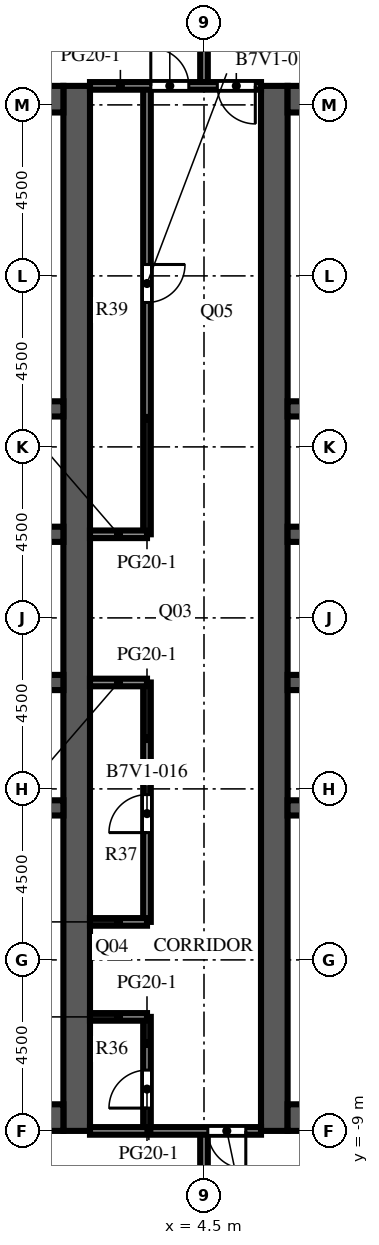
"""IFC4 building model, lengths in metres.
Left out: names, types, materials, properties, quantities, classifications, styles, units other than length and angle.
Written with IfcOpenShell. Run it as: python <this file> out.ifc"""

import sys

from ifc_helpers import new_model, si_unit, direction, frame, frame_2d, origin, place, context, subcontext, project, spatial, rectangle, extrude, element, fill, save


model = new_model("IFC4")
c1 = context("Model", 3, precision=1e-05, world=origin(), true_north=direction((0.0, 1.0)))
c2 = subcontext(c1, "Body", "Model", "MODEL_VIEW")
j1 = project(units=[si_unit("LENGTHUNIT", "METRE"), si_unit("PLANEANGLEUNIT", "RADIAN")], contexts=[c1])
p1 = place(None, origin())
s1 = spatial("IfcSite", under=j1, at=p1, CompositionType="ELEMENT")
p2 = place(p1, origin())
s2 = spatial("IfcBuilding", under=s1, at=p2, CompositionType="ELEMENT")
p3 = place(p2, frame((0.0, 0.0, 243.9)))
s3 = spatial("IfcBuildingStorey", under=s2, at=p3, CompositionType="ELEMENT", Elevation=243.9)
p4 = place(p3, frame((1.15, -9.0, 0.0), z_axis=(0.0, 0.0, 1.0), x_axis=(0.0, 1.0, 0.0)))
e1 = element("IfcWall", 1, at=p4, inside=s3, PredefinedType="SHEAR", context=c2, shape_type="SweptSolid", body=[
    extrude(rectangle(XDim=27.5, YDim=0.7, at=frame_2d((13.75, 0.0))), origin(), (0.0, 0.0, 1.0), 4.1),
])
p5 = place(p4, frame((12.55, 0.0, 0.0)))
e2 = element("IfcOpeningElement", 2, at=p5, cuts=e1, PredefinedType="OPENING", context=c2, shape_type="SweptSolid", body=[
    extrude(rectangle(XDim=2.4, YDim=2.4, at=frame_2d((1.2, 1.2))), frame((0.0, 0.36, 0.0), z_axis=(0.0, -1.0, 0.0), x_axis=(1.0, 0.0, 0.0)), (0.0, 0.0, 1.0), 0.72),
])
p6 = place(p4, frame((3.9, 0.0, 0.0)))
e3 = element("IfcOpeningElement", 3, at=p6, cuts=e1, PredefinedType="OPENING", context=c2, shape_type="SweptSolid", body=[
    extrude(rectangle(XDim=1.2, YDim=2.1, at=frame_2d((0.6, 1.05))), frame((0.0, 0.36, 0.0), z_axis=(0.0, -1.0, 0.0), x_axis=(1.0, 0.0, 0.0)), (0.0, 0.0, 1.0), 0.72),
])
p7 = place(p4, frame((22.4, 0.0, 0.0)))
e4 = element("IfcOpeningElement", 4, at=p7, cuts=e1, PredefinedType="OPENING", context=c2, shape_type="SweptSolid", body=[
    extrude(rectangle(XDim=1.2, YDim=2.1, at=frame_2d((0.6, 1.05))), frame((0.0, 0.36, 0.0), z_axis=(0.0, -1.0, 0.0), x_axis=(1.0, 0.0, 0.0)), (0.0, 0.0, 1.0), 0.72),
])
for number, where, z_axis, x_axis in (
    (5, (-9.8, -8.65, 0.0), (0.0, 0.0, 1.0), (1.0, 0.0, 0.0)),
    (6, (-9.8, 18.15, 0.0), (0.0, 0.0, 1.0), (1.0, 0.0, 0.0)),
):
    element("IfcWall", number, at=place(p3, frame(where, z_axis=z_axis, x_axis=x_axis)), inside=s3, PredefinedType="SHEAR", context=c2, shape_type="SweptSolid", body=[
        extrude(rectangle(XDim=10.6, YDim=0.7, at=frame_2d((5.3, 0.0))), origin(), (0.0, 0.0, 1.0), 4.1),
    ])
p8 = place(p3, frame((-9.8, -0.5, 0.0), z_axis=(0.0, 0.0, 1.0), x_axis=(1.0, 0.0, 0.0)))
e7 = element("IfcWall", 7, at=p8, inside=s3, PredefinedType="SHEAR", context=c2, shape_type="SweptSolid", body=[
    extrude(rectangle(XDim=10.6, YDim=0.4, at=frame_2d((5.3, 0.0))), origin(), (0.0, 0.0, 1.0), 4.1),
])
p9 = place(p3, frame((-9.8, 2.8, 0.0), z_axis=(0.0, 0.0, 1.0), x_axis=(1.0, 0.0, 0.0)))
e8 = element("IfcWall", 8, at=p9, inside=s3, PredefinedType="SHEAR", context=c2, shape_type="SweptSolid", body=[
    extrude(rectangle(XDim=10.6, YDim=0.4, at=frame_2d((5.3, 0.0))), origin(), (0.0, 0.0, 1.0), 4.1),
])
p10 = place(p9, frame((0.688, 0.0, 0.0)))
e9 = element("IfcOpeningElement", 9, at=p10, cuts=e8, PredefinedType="OPENING", context=c2, shape_type="SweptSolid", body=[
    extrude(rectangle(XDim=1.1, YDim=2.1, at=frame_2d((0.55, 1.05))), frame((0.0, 0.21, 0.0), z_axis=(0.0, -1.0, 0.0), x_axis=(1.0, 0.0, 0.0)), (0.0, 0.0, 1.0), 0.42),
])
p11 = place(p9, frame((3.438, 0.0, 0.0)))
e10 = element("IfcOpeningElement", 10, at=p11, cuts=e8, PredefinedType="OPENING", context=c2, shape_type="SweptSolid", body=[
    extrude(rectangle(XDim=1.1, YDim=2.1, at=frame_2d((0.55, 1.05))), frame((0.0, 0.21, 0.0), z_axis=(0.0, -1.0, 0.0), x_axis=(1.0, 0.0, 0.0)), (0.0, 0.0, 1.0), 0.42),
])
p12 = place(p9, frame((6.113, 0.0, 0.0)))
e11 = element("IfcOpeningElement", 11, at=p12, cuts=e8, PredefinedType="OPENING", context=c2, shape_type="SweptSolid", body=[
    extrude(rectangle(XDim=1.0, YDim=2.1, at=frame_2d((0.5, 1.05))), frame((0.0, 0.21, 0.0), z_axis=(0.0, -1.0, 0.0), x_axis=(1.0, 0.0, 0.0)), (0.0, 0.0, 1.0), 0.42),
])
p13 = place(p9, frame((8.863, 0.0, 0.0)))
e12 = element("IfcOpeningElement", 12, at=p13, cuts=e8, PredefinedType="OPENING", context=c2, shape_type="SweptSolid", body=[
    extrude(rectangle(XDim=1.0, YDim=2.1, at=frame_2d((0.5, 1.05))), frame((0.0, 0.21, 0.0), z_axis=(0.0, -1.0, 0.0), x_axis=(1.0, 0.0, 0.0)), (0.0, 0.0, 1.0), 0.42),
])
p14 = place(p3, frame((-9.8, 6.7, 0.0), z_axis=(0.0, 0.0, 1.0), x_axis=(1.0, 0.0, 0.0)))
e13 = element("IfcWall", 13, at=p14, inside=s3, PredefinedType="SHEAR", context=c2, shape_type="SweptSolid", body=[
    extrude(rectangle(XDim=10.6, YDim=0.4, at=frame_2d((5.3, 0.0))), origin(), (0.0, 0.0, 1.0), 4.1),
])
p15 = place(p14, frame((3.438, 0.0, 0.0)))
e14 = element("IfcOpeningElement", 14, at=p15, cuts=e13, PredefinedType="OPENING", context=c2, shape_type="SweptSolid", body=[
    extrude(rectangle(XDim=1.1, YDim=2.1, at=frame_2d((0.55, 1.05))), frame((0.0, 0.21, 0.0), z_axis=(0.0, -1.0, 0.0), x_axis=(1.0, 0.0, 0.0)), (0.0, 0.0, 1.0), 0.42),
])
p16 = place(p14, frame((6.062, 0.0, 0.0)))
e15 = element("IfcOpeningElement", 15, at=p16, cuts=e13, PredefinedType="OPENING", context=c2, shape_type="SweptSolid", body=[
    extrude(rectangle(XDim=1.1, YDim=2.1, at=frame_2d((0.55, 1.05))), frame((0.0, 0.21, 0.0), z_axis=(0.0, -1.0, 0.0), x_axis=(1.0, 0.0, 0.0)), (0.0, 0.0, 1.0), 0.42),
])
p17 = place(p14, frame((8.812, 0.0, 0.0)))
e16 = element("IfcOpeningElement", 16, at=p17, cuts=e13, PredefinedType="OPENING", context=c2, shape_type="SweptSolid", body=[
    extrude(rectangle(XDim=1.1, YDim=2.1, at=frame_2d((0.55, 1.05))), frame((0.0, 0.21, 0.0), z_axis=(0.0, -1.0, 0.0), x_axis=(1.0, 0.0, 0.0)), (0.0, 0.0, 1.0), 0.42),
])
p18 = place(p14, frame((0.738, 0.0, 0.0)))
e17 = element("IfcOpeningElement", 17, at=p18, cuts=e13, PredefinedType="OPENING", context=c2, shape_type="SweptSolid", body=[
    extrude(rectangle(XDim=1.0, YDim=2.1, at=frame_2d((0.5, 1.05))), frame((0.0, 0.21, 0.0), z_axis=(0.0, -1.0, 0.0), x_axis=(1.0, 0.0, 0.0)), (0.0, 0.0, 1.0), 0.42),
])
p19 = place(p3, frame((-9.8, 10.0, 0.0), z_axis=(0.0, 0.0, 1.0), x_axis=(1.0, 0.0, 0.0)))
e18 = element("IfcWall", 18, at=p19, inside=s3, PredefinedType="SHEAR", context=c2, shape_type="SweptSolid", body=[
    extrude(rectangle(XDim=10.6, YDim=0.4, at=frame_2d((5.3, 0.0))), origin(), (0.0, 0.0, 1.0), 4.1),
])
p20 = place(p3, frame((6.35, -9.0, 0.0), z_axis=(0.0, 0.0, 1.0), x_axis=(0.0, 1.0, 0.0)))
e19 = element("IfcWall", 19, at=p20, inside=s3, PredefinedType="SHEAR", context=c2, shape_type="SweptSolid", body=[
    extrude(rectangle(XDim=27.5, YDim=0.7, at=frame_2d((13.75, 0.0))), origin(), (0.0, 0.0, 1.0), 4.1),
])
p21 = place(p20, frame((12.55, 0.0, 0.0)))
e20 = element("IfcOpeningElement", 20, at=p21, cuts=e19, PredefinedType="OPENING", context=c2, shape_type="SweptSolid", body=[
    extrude(rectangle(XDim=2.4, YDim=2.4, at=frame_2d((1.2, 1.2))), frame((0.0, 0.36, 0.0), z_axis=(0.0, -1.0, 0.0), x_axis=(1.0, 0.0, 0.0)), (0.0, 0.0, 1.0), 0.72),
])
p22 = place(p20, frame((3.9, 0.0, 0.0)))
e21 = element("IfcOpeningElement", 21, at=p22, cuts=e19, PredefinedType="OPENING", context=c2, shape_type="SweptSolid", body=[
    extrude(rectangle(XDim=1.2, YDim=2.1, at=frame_2d((0.6, 1.05))), frame((0.0, 0.36, 0.0), z_axis=(0.0, -1.0, 0.0), x_axis=(1.0, 0.0, 0.0)), (0.0, 0.0, 1.0), 0.72),
])
p23 = place(p20, frame((22.4, 0.0, 0.0)))
e22 = element("IfcOpeningElement", 22, at=p23, cuts=e19, PredefinedType="OPENING", context=c2, shape_type="SweptSolid", body=[
    extrude(rectangle(XDim=1.2, YDim=2.1, at=frame_2d((0.6, 1.05))), frame((0.0, 0.36, 0.0), z_axis=(0.0, -1.0, 0.0), x_axis=(1.0, 0.0, 0.0)), (0.0, 0.0, 1.0), 0.72),
])
for number, where, z_axis, x_axis in (
    (23, (6.7, -8.65, 0.0), (0.0, 0.0, 1.0), (1.0, 0.0, 0.0)),
    (24, (6.7, 18.15, 0.0), (0.0, 0.0, 1.0), (1.0, 0.0, 0.0)),
):
    element("IfcWall", number, at=place(p3, frame(where, z_axis=z_axis, x_axis=x_axis)), inside=s3, PredefinedType="SHEAR", context=c2, shape_type="SweptSolid", body=[
        extrude(rectangle(XDim=10.6, YDim=0.7, at=frame_2d((5.3, 0.0))), origin(), (0.0, 0.0, 1.0), 4.1),
    ])
p24 = place(p3, frame((6.7, -0.5, 0.0), z_axis=(0.0, 0.0, 1.0), x_axis=(1.0, 0.0, 0.0)))
e25 = element("IfcWall", 25, at=p24, inside=s3, PredefinedType="SHEAR", context=c2, shape_type="SweptSolid", body=[
    extrude(rectangle(XDim=10.6, YDim=0.4, at=frame_2d((5.3, 0.0))), origin(), (0.0, 0.0, 1.0), 4.1),
])
p25 = place(p3, frame((6.7, 2.8, 0.0), z_axis=(0.0, 0.0, 1.0), x_axis=(1.0, 0.0, 0.0)))
e26 = element("IfcWall", 26, at=p25, inside=s3, PredefinedType="SHEAR", context=c2, shape_type="SweptSolid", body=[
    extrude(rectangle(XDim=10.6, YDim=0.4, at=frame_2d((5.3, 0.0))), origin(), (0.0, 0.0, 1.0), 4.1),
])
p26 = place(p25, frame((0.688, 0.0, 0.0)))
e27 = element("IfcOpeningElement", 27, at=p26, cuts=e26, PredefinedType="OPENING", context=c2, shape_type="SweptSolid", body=[
    extrude(rectangle(XDim=1.1, YDim=2.1, at=frame_2d((0.55, 1.05))), frame((0.0, 0.21, 0.0), z_axis=(0.0, -1.0, 0.0), x_axis=(1.0, 0.0, 0.0)), (0.0, 0.0, 1.0), 0.42),
])
p27 = place(p25, frame((3.438, 0.0, 0.0)))
e28 = element("IfcOpeningElement", 28, at=p27, cuts=e26, PredefinedType="OPENING", context=c2, shape_type="SweptSolid", body=[
    extrude(rectangle(XDim=1.1, YDim=2.1, at=frame_2d((0.55, 1.05))), frame((0.0, 0.21, 0.0), z_axis=(0.0, -1.0, 0.0), x_axis=(1.0, 0.0, 0.0)), (0.0, 0.0, 1.0), 0.42),
])
p28 = place(p25, frame((6.113, 0.0, 0.0)))
e29 = element("IfcOpeningElement", 29, at=p28, cuts=e26, PredefinedType="OPENING", context=c2, shape_type="SweptSolid", body=[
    extrude(rectangle(XDim=1.0, YDim=2.1, at=frame_2d((0.5, 1.05))), frame((0.0, 0.21, 0.0), z_axis=(0.0, -1.0, 0.0), x_axis=(1.0, 0.0, 0.0)), (0.0, 0.0, 1.0), 0.42),
])
p29 = place(p25, frame((8.863, 0.0, 0.0)))
e30 = element("IfcOpeningElement", 30, at=p29, cuts=e26, PredefinedType="OPENING", context=c2, shape_type="SweptSolid", body=[
    extrude(rectangle(XDim=1.0, YDim=2.1, at=frame_2d((0.5, 1.05))), frame((0.0, 0.21, 0.0), z_axis=(0.0, -1.0, 0.0), x_axis=(1.0, 0.0, 0.0)), (0.0, 0.0, 1.0), 0.42),
])
p30 = place(p3, frame((6.7, 6.7, 0.0), z_axis=(0.0, 0.0, 1.0), x_axis=(1.0, 0.0, 0.0)))
e31 = element("IfcWall", 31, at=p30, inside=s3, PredefinedType="SHEAR", context=c2, shape_type="SweptSolid", body=[
    extrude(rectangle(XDim=10.6, YDim=0.4, at=frame_2d((5.3, 0.0))), origin(), (0.0, 0.0, 1.0), 4.1),
])
p31 = place(p30, frame((3.438, 0.0, 0.0)))
e32 = element("IfcOpeningElement", 32, at=p31, cuts=e31, PredefinedType="OPENING", context=c2, shape_type="SweptSolid", body=[
    extrude(rectangle(XDim=1.1, YDim=2.1, at=frame_2d((0.55, 1.05))), frame((0.0, 0.21, 0.0), z_axis=(0.0, -1.0, 0.0), x_axis=(1.0, 0.0, 0.0)), (0.0, 0.0, 1.0), 0.42),
])
p32 = place(p30, frame((6.062, 0.0, 0.0)))
e33 = element("IfcOpeningElement", 33, at=p32, cuts=e31, PredefinedType="OPENING", context=c2, shape_type="SweptSolid", body=[
    extrude(rectangle(XDim=1.1, YDim=2.1, at=frame_2d((0.55, 1.05))), frame((0.0, 0.21, 0.0), z_axis=(0.0, -1.0, 0.0), x_axis=(1.0, 0.0, 0.0)), (0.0, 0.0, 1.0), 0.42),
])
p33 = place(p30, frame((8.812, 0.0, 0.0)))
e34 = element("IfcOpeningElement", 34, at=p33, cuts=e31, PredefinedType="OPENING", context=c2, shape_type="SweptSolid", body=[
    extrude(rectangle(XDim=1.1, YDim=2.1, at=frame_2d((0.55, 1.05))), frame((0.0, 0.21, 0.0), z_axis=(0.0, -1.0, 0.0), x_axis=(1.0, 0.0, 0.0)), (0.0, 0.0, 1.0), 0.42),
])
p34 = place(p30, frame((0.738, 0.0, 0.0)))
e35 = element("IfcOpeningElement", 35, at=p34, cuts=e31, PredefinedType="OPENING", context=c2, shape_type="SweptSolid", body=[
    extrude(rectangle(XDim=1.0, YDim=2.1, at=frame_2d((0.5, 1.05))), frame((0.0, 0.21, 0.0), z_axis=(0.0, -1.0, 0.0), x_axis=(1.0, 0.0, 0.0)), (0.0, 0.0, 1.0), 0.42),
])
p35 = place(p3, frame((6.7, 10.0, 0.0), z_axis=(0.0, 0.0, 1.0), x_axis=(1.0, 0.0, 0.0)))
e36 = element("IfcWall", 36, at=p35, inside=s3, PredefinedType="SHEAR", context=c2, shape_type="SweptSolid", body=[
    extrude(rectangle(XDim=10.6, YDim=0.4, at=frame_2d((5.3, 0.0))), origin(), (0.0, 0.0, 1.0), 4.1),
])
p36 = place(p3, frame((3.0, -9.0, 0.0), z_axis=(0.0, 0.0, 1.0), x_axis=(0.0, 1.0, 0.0)))
e37 = element("IfcWall", 37, at=p36, inside=s3, PredefinedType="PARTITIONING", context=c2, shape_type="SweptSolid", body=[
    extrude(rectangle(XDim=3.0, YDim=0.2, at=frame_2d((1.5, 0.0))), origin(), (0.0, 0.0, 1.0), 3.65),
])
p37 = place(p36, frame((0.6, 0.0, 0.0)))
e38 = element("IfcOpeningElement", 38, at=p37, cuts=e37, PredefinedType="OPENING", context=c2, shape_type="SweptSolid", body=[
    extrude(rectangle(XDim=1.0, YDim=2.1, at=frame_2d((0.5, 1.05))), frame((0.0, 0.11, 0.0), z_axis=(0.0, -1.0, 0.0), x_axis=(1.0, 0.0, 0.0)), (0.0, 0.0, 1.0), 0.22),
])
p38 = place(p3, frame((3.0, -3.5, 0.0), z_axis=(0.0, 0.0, 1.0), x_axis=(0.0, 1.0, 0.0)))
e39 = element("IfcWall", 39, at=p38, inside=s3, PredefinedType="PARTITIONING", context=c2, shape_type="SweptSolid", body=[
    extrude(rectangle(XDim=6.3, YDim=0.2, at=frame_2d((3.15, 0.0))), origin(), (0.0, 0.0, 1.0), 3.65),
])
p39 = place(p38, frame((2.35, 0.0, 0.0)))
e40 = element("IfcOpeningElement", 40, at=p39, cuts=e39, PredefinedType="OPENING", context=c2, shape_type="SweptSolid", body=[
    extrude(rectangle(XDim=1.0, YDim=2.1, at=frame_2d((0.5, 1.05))), frame((0.0, 0.11, 0.0), z_axis=(0.0, -1.0, 0.0), x_axis=(1.0, 0.0, 0.0)), (0.0, 0.0, 1.0), 0.22),
])
p40 = place(p3, frame((3.0, 6.7, 0.0), z_axis=(0.0, 0.0, 1.0), x_axis=(0.0, 1.0, 0.0)))
e41 = element("IfcWall", 41, at=p40, inside=s3, PredefinedType="PARTITIONING", context=c2, shape_type="SweptSolid", body=[
    extrude(rectangle(XDim=11.8, YDim=0.2, at=frame_2d((5.9, 0.0))), origin(), (0.0, 0.0, 1.0), 3.65),
])
p41 = place(p40, frame((6.1, 0.0, 0.0)))
e42 = element("IfcOpeningElement", 42, at=p41, cuts=e41, PredefinedType="OPENING", context=c2, shape_type="SweptSolid", body=[
    extrude(rectangle(XDim=1.0, YDim=2.1, at=frame_2d((0.5, 1.05))), frame((0.0, 0.11, 0.0), z_axis=(0.0, -1.0, 0.0), x_axis=(1.0, 0.0, 0.0)), (0.0, 0.0, 1.0), 0.22),
])
p42 = place(p3, frame((4.5, -22.1, 0.0), z_axis=(0.0, 0.0, 1.0), x_axis=(0.0, 1.0, 0.0)))
e43 = element("IfcWall", 43, at=p42, inside=s3, PredefinedType="PARTITIONING", context=c2, shape_type="SweptSolid", body=[
    extrude(rectangle(XDim=13.1, YDim=0.2, at=frame_2d((6.55, 0.0))), origin(), (0.0, 0.0, 1.0), 3.65),
])
p43 = place(p3, frame((4.5, 18.5, 0.0), z_axis=(0.0, 0.0, 1.0), x_axis=(0.0, 1.0, 0.0)))
e44 = element("IfcWall", 44, at=p43, inside=s3, PredefinedType="PARTITIONING", context=c2, shape_type="SweptSolid", body=[
    extrude(rectangle(XDim=12.6, YDim=0.2, at=frame_2d((6.3, 0.0))), origin(), (0.0, 0.0, 1.0), 3.65),
])
p44 = place(p3, frame((6.0, -9.0, 0.0), z_axis=(0.0, 0.0, 1.0), x_axis=(-1.0, 0.0, 0.0)))
e45 = element("IfcWall", 45, at=p44, inside=s3, PredefinedType="PARTITIONING", context=c2, shape_type="SweptSolid", body=[
    extrude(rectangle(XDim=4.5, YDim=0.2, at=frame_2d((2.25, 0.0))), origin(), (0.0, 0.0, 1.0), 3.65),
])
p45 = place(p44, frame((0.4, 0.0, 0.0)))
e46 = element("IfcOpeningElement", 46, at=p45, cuts=e45, PredefinedType="OPENING", context=c2, shape_type="SweptSolid", body=[
    extrude(rectangle(XDim=1.0, YDim=2.1, at=frame_2d((0.5, 1.05))), frame((0.0, 0.11, 0.0), z_axis=(0.0, -1.0, 0.0), x_axis=(1.0, 0.0, 0.0)), (0.0, 0.0, 1.0), 0.22),
])
for number, where, z_axis, x_axis in (
    (47, (1.5, -6.0, 0.0), (0.0, 0.0, 1.0), (1.0, 0.0, 0.0)),
    (48, (1.5, -3.5, 0.0), (0.0, 0.0, 1.0), (1.0, 0.0, 0.0)),
    (49, (1.5, 2.8, 0.0), (0.0, 0.0, 1.0), (1.0, 0.0, 0.0)),
    (50, (1.5, 6.7, 0.0), (0.0, 0.0, 1.0), (1.0, 0.0, 0.0)),
):
    element("IfcWall", number, at=place(p3, frame(where, z_axis=z_axis, x_axis=x_axis)), inside=s3, PredefinedType="PARTITIONING", context=c2, shape_type="SweptSolid", body=[
        extrude(rectangle(XDim=1.5, YDim=0.2, at=frame_2d((0.75, 0.0))), origin(), (0.0, 0.0, 1.0), 3.65),
    ])
p46 = place(p3, frame((1.5, 18.5, 0.0), z_axis=(0.0, 0.0, 1.0), x_axis=(1.0, 0.0, 0.0)))
e51 = element("IfcWall", 51, at=p46, inside=s3, PredefinedType="PARTITIONING", context=c2, shape_type="SweptSolid", body=[
    extrude(rectangle(XDim=4.5, YDim=0.2, at=frame_2d((2.25, 0.0))), origin(), (0.0, 0.0, 1.0), 3.65),
])
p47 = place(p46, frame((1.6, 0.0, 0.0)))
e52 = element("IfcOpeningElement", 52, at=p47, cuts=e51, PredefinedType="OPENING", context=c2, shape_type="SweptSolid", body=[
    extrude(rectangle(XDim=1.0, YDim=2.1, at=frame_2d((0.5, 1.05))), frame((0.0, 0.11, 0.0), z_axis=(0.0, -1.0, 0.0), x_axis=(1.0, 0.0, 0.0)), (0.0, 0.0, 1.0), 0.22),
])
p48 = place(p46, frame((3.35, 0.0, 0.0)))
e53 = element("IfcOpeningElement", 53, at=p48, cuts=e51, PredefinedType="OPENING", context=c2, shape_type="SweptSolid", body=[
    extrude(rectangle(XDim=1.0, YDim=2.1, at=frame_2d((0.5, 1.05))), frame((0.0, 0.11, 0.0), z_axis=(0.0, -1.0, 0.0), x_axis=(1.0, 0.0, 0.0)), (0.0, 0.0, 1.0), 0.22),
])
p49 = place(p5, origin())
e54 = element("IfcDoor", 54, at=p49, inside=s3, OperationType="DOUBLE_DOOR_DOUBLE_SWING", PredefinedType="DOOR", context=c2, shape_type="SweptSolid", body=[
    extrude(rectangle(XDim=2.4, YDim=2.4, at=frame_2d((1.2, 1.2))), frame((0.0, 0.025, 0.0), z_axis=(0.0, -1.0, 0.0), x_axis=(1.0, 0.0, 0.0)), (0.0, 0.0, 1.0), 0.05),
])
fill(e2, e54)
p50 = place(p21, origin())
e55 = element("IfcDoor", 55, at=p50, inside=s3, OperationType="DOUBLE_DOOR_DOUBLE_SWING", PredefinedType="DOOR", context=c2, shape_type="SweptSolid", body=[
    extrude(rectangle(XDim=2.4, YDim=2.4, at=frame_2d((1.2, 1.2))), frame((0.0, 0.025, 0.0), z_axis=(0.0, -1.0, 0.0), x_axis=(1.0, 0.0, 0.0)), (0.0, 0.0, 1.0), 0.05),
])
fill(e20, e55)
p51 = place(p6, origin())
e56 = element("IfcDoor", 56, at=p51, inside=s3, OperationType="SINGLE_SWING_LEFT", PredefinedType="DOOR", context=c2, shape_type="SweptSolid", body=[
    extrude(rectangle(XDim=1.2, YDim=2.1, at=frame_2d((0.6, 1.05))), frame((0.0, 0.325, 0.0), z_axis=(0.0, -1.0, 0.0), x_axis=(1.0, 0.0, 0.0)), (0.0, 0.0, 1.0), 0.05),
])
fill(e3, e56)
p52 = place(p7, origin())
e57 = element("IfcDoor", 57, at=p52, inside=s3, OperationType="SINGLE_SWING_LEFT", PredefinedType="DOOR", context=c2, shape_type="SweptSolid", body=[
    extrude(rectangle(XDim=1.2, YDim=2.1, at=frame_2d((0.6, 1.05))), frame((0.0, 0.325, 0.0), z_axis=(0.0, -1.0, 0.0), x_axis=(1.0, 0.0, 0.0)), (0.0, 0.0, 1.0), 0.05),
])
fill(e4, e57)
p53 = place(p22, origin())
e58 = element("IfcDoor", 58, at=p53, inside=s3, OperationType="SINGLE_SWING_RIGHT", PredefinedType="DOOR", context=c2, shape_type="SweptSolid", body=[
    extrude(rectangle(XDim=1.2, YDim=2.1, at=frame_2d((0.6, 1.05))), frame((0.0, -0.275, 0.0), z_axis=(0.0, -1.0, 0.0), x_axis=(1.0, 0.0, 0.0)), (0.0, 0.0, 1.0), 0.05),
])
fill(e21, e58)
p54 = place(p23, origin())
e59 = element("IfcDoor", 59, at=p54, inside=s3, OperationType="SINGLE_SWING_RIGHT", PredefinedType="DOOR", context=c2, shape_type="SweptSolid", body=[
    extrude(rectangle(XDim=1.2, YDim=2.1, at=frame_2d((0.6, 1.05))), frame((0.0, -0.275, 0.0), z_axis=(0.0, -1.0, 0.0), x_axis=(1.0, 0.0, 0.0)), (0.0, 0.0, 1.0), 0.05),
])
fill(e22, e59)
p55 = place(p45, origin())
e60 = element("IfcDoor", 60, at=p55, inside=s3, OperationType="SINGLE_SWING_LEFT", PredefinedType="DOOR", context=c2, shape_type="SweptSolid", body=[
    extrude(rectangle(XDim=1.0, YDim=2.1, at=frame_2d((0.5, 1.05))), frame((0.0, 0.025, 0.0), z_axis=(0.0, -1.0, 0.0), x_axis=(1.0, 0.0, 0.0)), (0.0, 0.0, 1.0), 0.05),
])
fill(e46, e60)
p56 = place(p37, origin())
e61 = element("IfcDoor", 61, at=p56, inside=s3, OperationType="SINGLE_SWING_LEFT", PredefinedType="DOOR", context=c2, shape_type="SweptSolid", body=[
    extrude(rectangle(XDim=1.0, YDim=2.1, at=frame_2d((0.5, 1.05))), frame((0.0, 0.025, 0.0), z_axis=(0.0, -1.0, 0.0), x_axis=(1.0, 0.0, 0.0)), (0.0, 0.0, 1.0), 0.05),
])
fill(e38, e61)
p57 = place(p39, origin())
e62 = element("IfcDoor", 62, at=p57, inside=s3, OperationType="SINGLE_SWING_LEFT", PredefinedType="DOOR", context=c2, shape_type="SweptSolid", body=[
    extrude(rectangle(XDim=1.0, YDim=2.1, at=frame_2d((0.5, 1.05))), frame((0.0, 0.025, 0.0), z_axis=(0.0, -1.0, 0.0), x_axis=(1.0, 0.0, 0.0)), (0.0, 0.0, 1.0), 0.05),
])
fill(e40, e62)
p58 = place(p41, origin())
e63 = element("IfcDoor", 63, at=p58, inside=s3, OperationType="SINGLE_SWING_RIGHT", PredefinedType="DOOR", context=c2, shape_type="SweptSolid", body=[
    extrude(rectangle(XDim=1.0, YDim=2.1, at=frame_2d((0.5, 1.05))), frame((0.0, 0.025, 0.0), z_axis=(0.0, -1.0, 0.0), x_axis=(1.0, 0.0, 0.0)), (0.0, 0.0, 1.0), 0.05),
])
fill(e42, e63)
p59 = place(p47, origin())
e64 = element("IfcDoor", 64, at=p59, inside=s3, OperationType="SINGLE_SWING_LEFT", PredefinedType="DOOR", context=c2, shape_type="SweptSolid", body=[
    extrude(rectangle(XDim=1.0, YDim=2.1, at=frame_2d((0.5, 1.05))), frame((0.0, 0.025, 0.0), z_axis=(0.0, -1.0, 0.0), x_axis=(1.0, 0.0, 0.0)), (0.0, 0.0, 1.0), 0.05),
])
fill(e52, e64)
p60 = place(p48, origin())
e65 = element("IfcDoor", 65, at=p60, inside=s3, OperationType="SINGLE_SWING_RIGHT", PredefinedType="DOOR", context=c2, shape_type="SweptSolid", body=[
    extrude(rectangle(XDim=1.0, YDim=2.1, at=frame_2d((0.5, 1.05))), frame((0.0, 0.025, 0.0), z_axis=(0.0, -1.0, 0.0), x_axis=(1.0, 0.0, 0.0)), (0.0, 0.0, 1.0), 0.05),
])
fill(e53, e65)
save(model, sys.argv[1])
